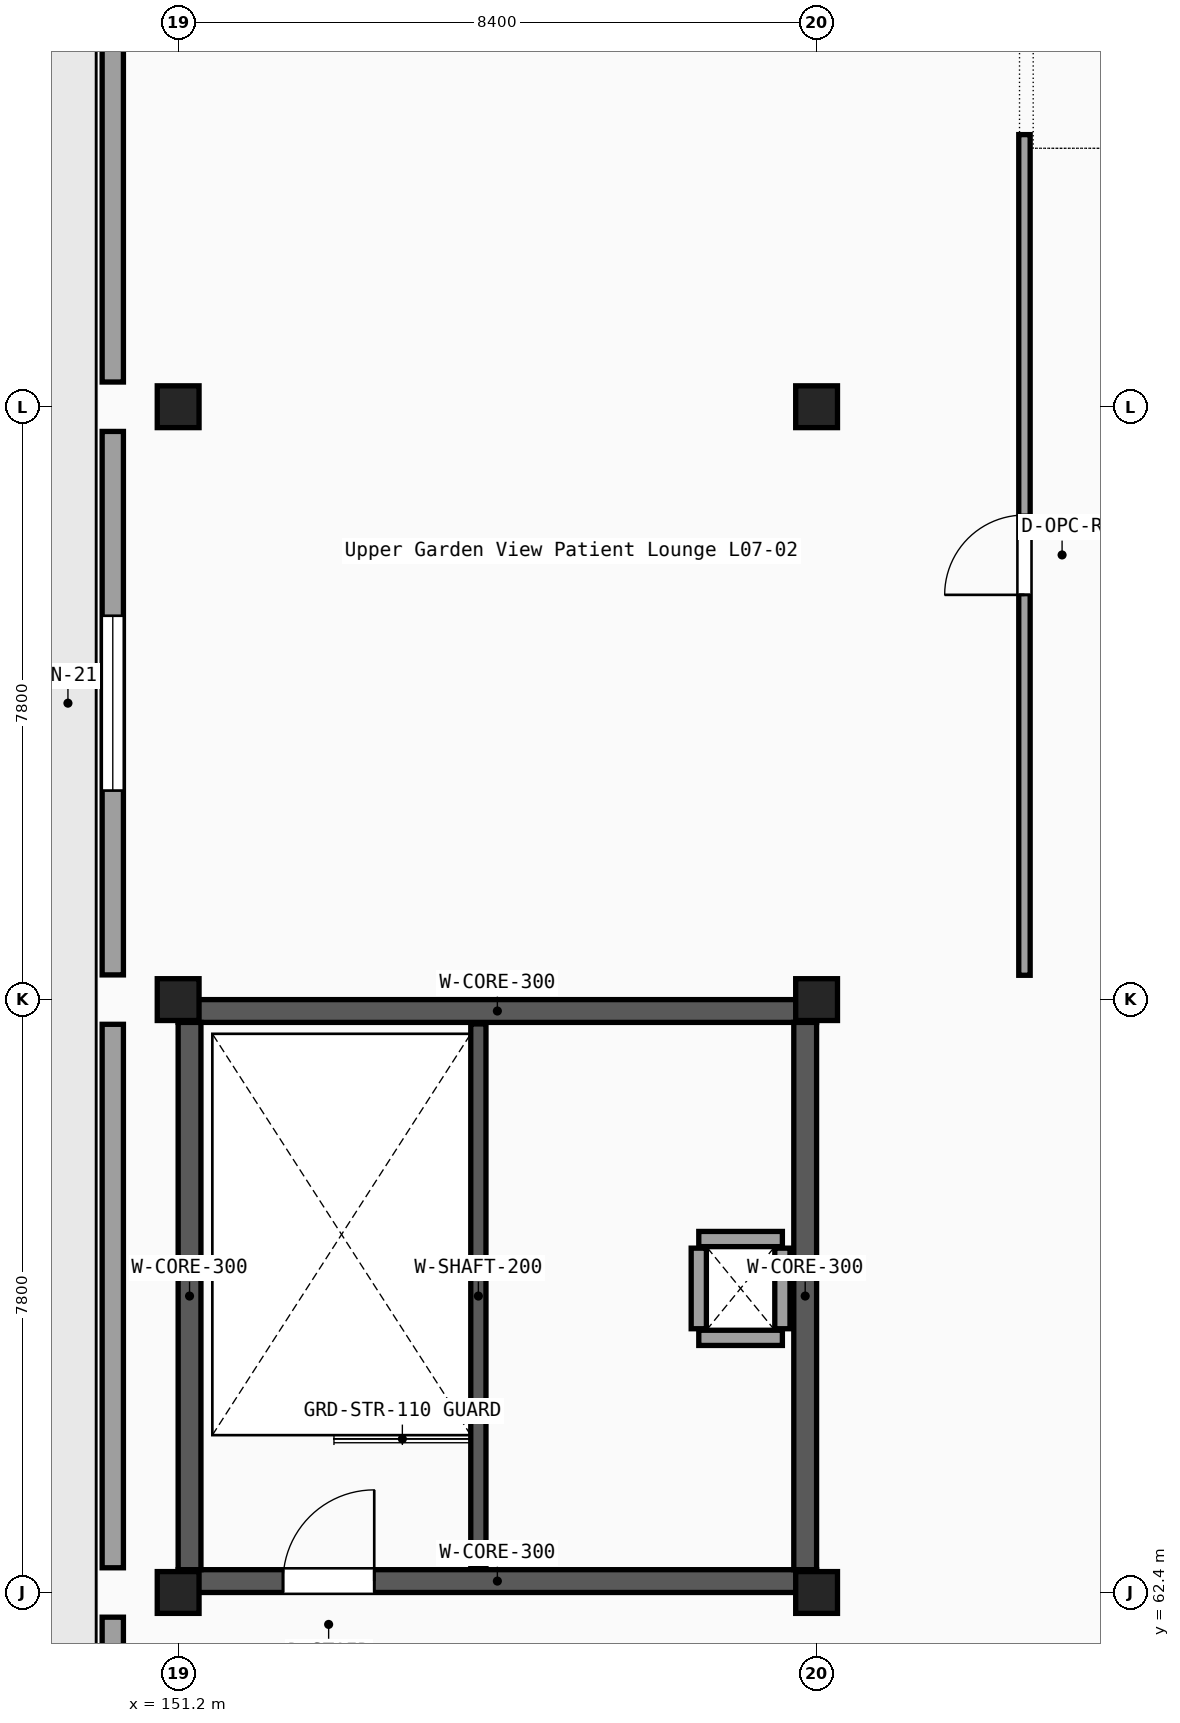
"""IFC4 building model, lengths in metres.
Left out: names, types, materials, properties, quantities, classifications, styles, units other than length and angle.
Written with IfcOpenShell. Run it as: python <this file> out.ifc"""

import sys

from ifc_helpers import new_model, si_unit, direction, frame, frame_2d, origin, origin_2d, place, context, subcontext, project, spatial, rectangle, extrude, element, fill, save


model = new_model("IFC4")
c1 = context("Model", 3, precision=1e-05, world=origin(), true_north=direction((0.0, 1.0)))
c2 = subcontext(c1, "Body", "Model", "MODEL_VIEW")
j1 = project(units=[si_unit("LENGTHUNIT", "METRE"), si_unit("PLANEANGLEUNIT", "RADIAN")], contexts=[c1])
p1 = place(None, origin())
s1 = spatial("IfcSite", under=j1, at=p1, CompositionType="ELEMENT")
p2 = place(p1, origin())
s2 = spatial("IfcBuilding", under=s1, at=p2, CompositionType="ELEMENT")
p3 = place(p2, frame((0.0, 0.0, 31.05)))
s3 = spatial("IfcBuildingStorey", under=s2, at=p3, CompositionType="ELEMENT", Elevation=31.05)
for number, where, z_axis, x_axis in (
    (1, (151.2, 62.4, 0.0), (0.0, 0.0, 1.0), (1.0, 0.0, 0.0)),
    (2, (151.2, 70.2, 0.0), (0.0, 0.0, 1.0), (1.0, 0.0, 0.0)),
    (3, (151.2, 78.0, 0.0), (0.0, 0.0, 1.0), (1.0, 0.0, 0.0)),
    (4, (159.6, 62.4, 0.0), (0.0, 0.0, 1.0), (1.0, 0.0, 0.0)),
    (5, (159.6, 70.2, 0.0), (0.0, 0.0, 1.0), (1.0, 0.0, 0.0)),
    (6, (159.6, 78.0, 0.0), (0.0, 0.0, 1.0), (1.0, 0.0, 0.0)),
):
    element("IfcColumn", number, at=place(p3, frame(where, z_axis=z_axis, x_axis=x_axis)), inside=s3, PredefinedType="COLUMN", context=c2, shape_type="SweptSolid", body=[
        extrude(rectangle(XDim=0.55, YDim=0.55, at=origin_2d()), origin(), (0.0, 0.0, 1.0), 4.05),
    ])
for number, where, z_axis, x_axis in (
    (7, (150.34, 54.925, 0.0), (0.0, 0.0, 1.0), (0.0, 1.0, 0.0)),
    (8, (150.34, 62.725, 0.0), (0.0, 0.0, 1.0), (0.0, 1.0, 0.0)),
):
    element("IfcWall", number, at=place(p3, frame(where, z_axis=z_axis, x_axis=x_axis)), inside=s3, PredefinedType="SOLIDWALL", context=c2, shape_type="SweptSolid", body=[
        extrude(rectangle(XDim=7.15, YDim=0.28, at=frame_2d((3.575, 0.0))), origin(), (0.0, 0.0, 1.0), 3.77),
    ])
p4 = place(p3, frame((150.34, 70.525, 0.0), z_axis=(0.0, 0.0, 1.0), x_axis=(0.0, 1.0, 0.0)))
e9 = element("IfcWall", 9, at=p4, inside=s3, PredefinedType="SOLIDWALL", context=c2, shape_type="SweptSolid", body=[
    extrude(rectangle(XDim=7.15, YDim=0.28, at=frame_2d((3.575, 0.0))), origin(), (0.0, 0.0, 1.0), 3.77),
])
p5 = place(p4, frame((2.425, 0.0, 0.95)))
e10 = element("IfcOpeningElement", 10, at=p5, cuts=e9, PredefinedType="OPENING", context=c2, shape_type="SweptSolid", body=[
    extrude(rectangle(XDim=2.3, YDim=1.55, at=frame_2d((1.15, 0.775))), frame((0.0, 0.15, 0.0), z_axis=(0.0, -1.0, 0.0), x_axis=(1.0, 0.0, 0.0)), (0.0, 0.0, 1.0), 0.3),
])
p6 = place(p3, frame((150.34, 78.325, 0.0), z_axis=(0.0, 0.0, 1.0), x_axis=(0.0, 1.0, 0.0)))
e11 = element("IfcWall", 11, at=p6, inside=s3, PredefinedType="SOLIDWALL", context=c2, shape_type="SweptSolid", body=[
    extrude(rectangle(XDim=7.15, YDim=0.28, at=frame_2d((3.575, 0.0))), origin(), (0.0, 0.0, 1.0), 3.77),
])
p7 = place(p3, frame((151.2, 62.55, 0.0), z_axis=(0.0, 0.0, 1.0), x_axis=(1.0, 0.0, 0.0)))
e12 = element("IfcWall", 12, at=p7, inside=s3, PredefinedType="SHEAR", context=c2, shape_type="SweptSolid", body=[
    extrude(rectangle(XDim=8.4, YDim=0.3, at=frame_2d((4.2, 0.0))), origin(), (0.0, 0.0, 1.0), 3.81),
])
p8 = place(p7, frame((1.38, 0.0, 0.0)))
e13 = element("IfcOpeningElement", 13, at=p8, cuts=e12, PredefinedType="OPENING", context=c2, shape_type="SweptSolid", body=[
    extrude(rectangle(XDim=1.2, YDim=2.15, at=frame_2d((0.6, 1.075))), frame((0.0, 0.16, 0.0), z_axis=(0.0, -1.0, 0.0), x_axis=(1.0, 0.0, 0.0)), (0.0, 0.0, 1.0), 0.32),
])
p9 = place(p3, frame((151.2, 70.05, 0.0), z_axis=(0.0, 0.0, 1.0), x_axis=(1.0, 0.0, 0.0)))
e14 = element("IfcWall", 14, at=p9, inside=s3, PredefinedType="SHEAR", context=c2, shape_type="SweptSolid", body=[
    extrude(rectangle(XDim=8.4, YDim=0.3, at=frame_2d((4.2, 0.0))), origin(), (0.0, 0.0, 1.0), 3.81),
])
for number, where, z_axis, x_axis in (
    (15, (151.35, 62.7, 0.0), (0.0, 0.0, 1.0), (0.0, 1.0, 0.0)),
    (16, (159.45, 62.7, 0.0), (0.0, 0.0, 1.0), (0.0, 1.0, 0.0)),
):
    element("IfcWall", number, at=place(p3, frame(where, z_axis=z_axis, x_axis=x_axis)), inside=s3, PredefinedType="SHEAR", context=c2, shape_type="SweptSolid", body=[
        extrude(rectangle(XDim=7.2, YDim=0.3, at=frame_2d((3.6, 0.0))), origin(), (0.0, 0.0, 1.0), 3.81),
    ])
p10 = place(p3, frame((155.15, 62.72, 0.0), z_axis=(0.0, 0.0, 1.0), x_axis=(0.0, 1.0, 0.0)))
e17 = element("IfcWall", 17, at=p10, inside=s3, PredefinedType="SHEAR", context=c2, shape_type="SweptSolid", body=[
    extrude(rectangle(XDim=7.16, YDim=0.2, at=frame_2d((3.58, 0.0))), origin(), (0.0, 0.0, 1.0), 3.81),
])
for number, where, z_axis, x_axis in (
    (18, (158.05, 65.75, 0.0), (0.0, 0.0, 1.0), (1.0, 0.0, 0.0)),
    (19, (158.05, 67.05, 0.0), (0.0, 0.0, 1.0), (1.0, 0.0, 0.0)),
):
    element("IfcWall", number, at=place(p3, frame(where, z_axis=z_axis, x_axis=x_axis)), inside=s3, PredefinedType="PARTITIONING", context=c2, shape_type="SweptSolid", body=[
        extrude(rectangle(XDim=1.1, YDim=0.2, at=frame_2d((0.55, 0.0))), origin(), (0.0, 0.0, 1.0), 3.34),
    ])
for number, where, z_axis, x_axis in (
    (20, (158.05, 65.87, 0.0), (0.0, 0.0, 1.0), (0.0, 1.0, 0.0)),
    (21, (159.15, 65.87, 0.0), (0.0, 0.0, 1.0), (0.0, 1.0, 0.0)),
):
    element("IfcWall", number, at=place(p3, frame(where, z_axis=z_axis, x_axis=x_axis)), inside=s3, PredefinedType="PARTITIONING", context=c2, shape_type="SweptSolid", body=[
        extrude(rectangle(XDim=1.06, YDim=0.2, at=frame_2d((0.53, 0.0))), origin(), (0.0, 0.0, 1.0), 3.34),
    ])
p11 = place(p3, frame((162.335, 70.52, 0.0), z_axis=(0.0, 0.0, 1.0), x_axis=(0.0, 1.0, 0.0)))
e22 = element("IfcWall", 22, at=p11, inside=s3, PredefinedType="PARTITIONING", context=c2, shape_type="SweptSolid", body=[
    extrude(rectangle(XDim=11.06, YDim=0.15, at=frame_2d((5.53, 0.0))), origin(), (0.0, 0.0, 1.0), 3.34),
])
p12 = place(p11, frame((5.005, 0.0, 0.0)))
e23 = element("IfcOpeningElement", 23, at=p12, cuts=e22, PredefinedType="OPENING", context=c2, shape_type="SweptSolid", body=[
    extrude(rectangle(XDim=1.05, YDim=2.15, at=frame_2d((0.525, 1.075))), frame((0.0, 0.085, 0.0), z_axis=(0.0, -1.0, 0.0), x_axis=(1.0, 0.0, 0.0)), (0.0, 0.0, 1.0), 0.17),
])
p13 = place(p5, origin())
e24 = element("IfcWindow", 24, at=p13, inside=s3, PartitioningType="SINGLE_PANEL", PredefinedType="WINDOW", context=c2, shape_type="SweptSolid", body=[
    extrude(rectangle(XDim=2.3, YDim=1.55, at=frame_2d((1.15, 0.775))), frame((0.0, 0.03, 0.0), z_axis=(0.0, -1.0, 0.0), x_axis=(1.0, 0.0, 0.0)), (0.0, 0.0, 1.0), 0.06),
])
fill(e10, e24)
p14 = place(p8, origin())
e25 = element("IfcDoor", 25, at=p14, inside=s3, OperationType="SINGLE_SWING_RIGHT", PredefinedType="DOOR", context=c2, shape_type="SweptSolid", body=[
    extrude(rectangle(XDim=1.2, YDim=2.15, at=frame_2d((0.6, 1.075))), frame((0.0, 0.025, 0.0), z_axis=(0.0, -1.0, 0.0), x_axis=(1.0, 0.0, 0.0)), (0.0, 0.0, 1.0), 0.05),
])
fill(e13, e25)
p15 = place(p12, origin())
e26 = element("IfcDoor", 26, at=p15, inside=s3, OperationType="SINGLE_SWING_LEFT", PredefinedType="DOOR", context=c2, shape_type="SweptSolid", body=[
    extrude(rectangle(XDim=1.05, YDim=2.15, at=frame_2d((0.525, 1.075))), frame((0.0, 0.025, 0.0), z_axis=(0.0, -1.0, 0.0), x_axis=(1.0, 0.0, 0.0)), (0.0, 0.0, 1.0), 0.05),
])
fill(e23, e26)
save(model, sys.argv[1])
